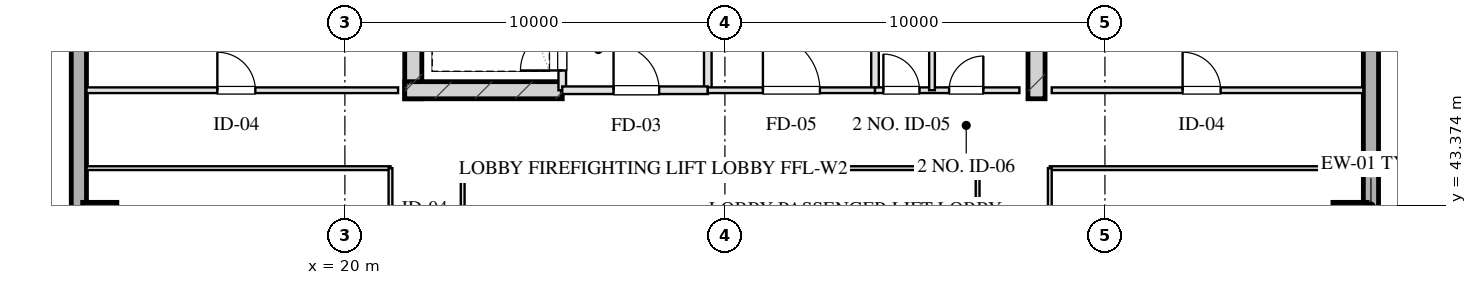
"""IFC4 building model, lengths in metres.
Left out: names, types, materials, properties, quantities, classifications, styles, units other than length and angle.
Written with IfcOpenShell. Run it as: python <this file> out.ifc"""

import sys

from ifc_helpers import new_model, si_unit, direction, frame, frame_2d, origin, origin_2d, place, context, subcontext, project, spatial, rectangle, hollow_rectangle, extrude, element, fill, save


model = new_model("IFC4")
c1 = context("Model", 3, precision=1e-05, world=origin(), true_north=direction((0.0, 1.0)))
c2 = subcontext(c1, "Body", "Model", "MODEL_VIEW")
j1 = project(units=[si_unit("LENGTHUNIT", "METRE"), si_unit("PLANEANGLEUNIT", "RADIAN")], contexts=[c1])
p1 = place(None, origin())
s1 = spatial("IfcSite", under=j1, at=p1, CompositionType="ELEMENT")
p2 = place(p1, origin())
s2 = spatial("IfcBuilding", under=s1, at=p2, CompositionType="ELEMENT")
p3 = place(p2, frame((0.0, 0.0, 209.3)))
s3 = spatial("IfcBuildingStorey", under=s2, at=p3, CompositionType="ELEMENT", Elevation=209.3)
for number, where, z_axis, x_axis in (
    (1, (21.8, 46.175, 0.0), (0.0, 0.0, 1.0), (0.0, 1.0, 0.0)),
    (2, (38.2, 46.175, 0.0), (0.0, 0.0, 1.0), (0.0, 1.0, 0.0)),
):
    element("IfcWall", number, at=place(p3, frame(where, z_axis=z_axis, x_axis=x_axis)), inside=s3, PredefinedType="SHEAR", context=c2, shape_type="SweptSolid", body=[
        extrude(rectangle(XDim=9.33, YDim=0.45, at=frame_2d((4.665, 0.0))), origin(), (0.0, 0.0, 1.0), 3.45),
    ])
p4 = place(p3, frame((21.575, 46.4, 0.0), z_axis=(0.0, 0.0, 1.0), x_axis=(1.0, 0.0, 0.0)))
e3 = element("IfcWall", 3, at=p4, inside=s3, PredefinedType="SHEAR", context=c2, shape_type="SweptSolid", body=[
    extrude(rectangle(XDim=4.145, YDim=0.45, at=frame_2d((2.073, 0.0))), origin(), (0.0, 0.0, 1.0), 3.45),
])
for number, where, z_axis, x_axis in (
    (4, (13.55, 43.0, 0.0), (0.0, 0.0, 1.0), (1.0, 0.0, 0.0)),
    (5, (46.45, 43.0, 0.0), (0.0, 0.0, 1.0), (1.0, 0.0, 0.0)),
):
    element("IfcColumn", number, at=place(p3, frame(where, z_axis=z_axis, x_axis=x_axis)), inside=s3, PredefinedType="COLUMN", context=c2, shape_type="SweptSolid", body=[
        extrude(hollow_rectangle(XDim=0.9, YDim=0.9, WallThickness=0.032, at=origin_2d()), origin(), (0.0, 0.0, 1.0), 3.451),
    ])
p5 = place(p3, frame((13.0, 10.8, 0.0), z_axis=(0.0, 0.0, 1.0), x_axis=(0.0, 1.0, 0.0)))
e6 = element("IfcWall", 6, at=p5, inside=s3, PredefinedType="SOLIDWALL", context=c2, shape_type="SweptSolid", body=[
    extrude(rectangle(XDim=46.4, YDim=0.4, at=frame_2d((23.2, 0.0))), origin(), (0.0, 0.0, 1.0), 2.61),
])
p6 = place(p5, frame((24.75, 0.0, 0.75)))
e7 = element("IfcOpeningElement", 7, at=p6, cuts=e6, PredefinedType="OPENING", context=c2, shape_type="SweptSolid", body=[
    extrude(rectangle(XDim=2.1, YDim=1.46, at=frame_2d((1.05, 0.73))), frame((0.0, 0.21, 0.0), z_axis=(0.0, -1.0, 0.0), x_axis=(1.0, 0.0, 0.0)), (0.0, 0.0, 1.0), 0.42),
])
p7 = place(p5, frame((28.55, 0.0, 0.75)))
e8 = element("IfcOpeningElement", 8, at=p7, cuts=e6, PredefinedType="OPENING", context=c2, shape_type="SweptSolid", body=[
    extrude(rectangle(XDim=2.1, YDim=1.46, at=frame_2d((1.05, 0.73))), frame((0.0, 0.21, 0.0), z_axis=(0.0, -1.0, 0.0), x_axis=(1.0, 0.0, 0.0)), (0.0, 0.0, 1.0), 0.42),
])
p8 = place(p5, frame((19.55, 0.0, 0.0)))
e9 = element("IfcOpeningElement", 9, at=p8, cuts=e6, PredefinedType="OPENING", context=c2, shape_type="SweptSolid", body=[
    extrude(rectangle(XDim=1.1, YDim=2.15, at=frame_2d((0.55, 1.075))), frame((0.0, 0.21, 0.0), z_axis=(0.0, -1.0, 0.0), x_axis=(1.0, 0.0, 0.0)), (0.0, 0.0, 1.0), 0.42),
])
p9 = place(p3, frame((47.0, 57.2, 0.0), z_axis=(0.0, 0.0, 1.0), x_axis=(0.0, -1.0, 0.0)))
e10 = element("IfcWall", 10, at=p9, inside=s3, PredefinedType="SOLIDWALL", context=c2, shape_type="SweptSolid", body=[
    extrude(rectangle(XDim=46.4, YDim=0.4, at=frame_2d((23.2, 0.0))), origin(), (0.0, 0.0, 1.0), 2.61),
])
p10 = place(p9, frame((19.55, 0.0, 0.75)))
e11 = element("IfcOpeningElement", 11, at=p10, cuts=e10, PredefinedType="OPENING", context=c2, shape_type="SweptSolid", body=[
    extrude(rectangle(XDim=2.1, YDim=1.46, at=frame_2d((1.05, 0.73))), frame((0.0, 0.21, 0.0), z_axis=(0.0, -1.0, 0.0), x_axis=(1.0, 0.0, 0.0)), (0.0, 0.0, 1.0), 0.42),
])
p11 = place(p9, frame((15.75, 0.0, 0.75)))
e12 = element("IfcOpeningElement", 12, at=p11, cuts=e10, PredefinedType="OPENING", context=c2, shape_type="SweptSolid", body=[
    extrude(rectangle(XDim=2.1, YDim=1.46, at=frame_2d((1.05, 0.73))), frame((0.0, 0.21, 0.0), z_axis=(0.0, -1.0, 0.0), x_axis=(1.0, 0.0, 0.0)), (0.0, 0.0, 1.0), 0.42),
])
p12 = place(p9, frame((28.45, 0.0, 0.0)))
e13 = element("IfcOpeningElement", 13, at=p12, cuts=e10, PredefinedType="OPENING", context=c2, shape_type="SweptSolid", body=[
    extrude(rectangle(XDim=1.1, YDim=2.15, at=frame_2d((0.55, 1.075))), frame((0.0, 0.21, 0.0), z_axis=(0.0, -1.0, 0.0), x_axis=(1.0, 0.0, 0.0)), (0.0, 0.0, 1.0), 0.42),
])
p13 = place(p3, frame((25.72, 46.4, 0.0), z_axis=(0.0, 0.0, 1.0), x_axis=(0.0, 1.0, 0.0)))
e14 = element("IfcWall", 14, at=p13, inside=s3, PredefinedType="PARTITIONING", context=c2, shape_type="SweptSolid", body=[
    extrude(rectangle(XDim=1.9, YDim=0.2, at=frame_2d((0.95, 0.0))), origin(), (0.0, 0.0, 1.0), 3.175),
])
p14 = place(p13, frame((0.52, 0.0, 0.0)))
e15 = element("IfcOpeningElement", 15, at=p14, cuts=e14, PredefinedType="OPENING", context=c2, shape_type="SweptSolid", body=[
    extrude(rectangle(XDim=1.1, YDim=2.05, at=frame_2d((0.55, 1.025))), frame((0.0, 0.11, 0.0), z_axis=(0.0, -1.0, 0.0), x_axis=(1.0, 0.0, 0.0)), (0.0, 0.0, 1.0), 0.22),
])
p15 = place(p3, frame((29.55, 46.4, 0.0), z_axis=(0.0, 0.0, 1.0), x_axis=(0.0, 1.0, 0.0)))
e16 = element("IfcWall", 16, at=p15, inside=s3, PredefinedType="PARTITIONING", context=c2, shape_type="SweptSolid", body=[
    extrude(rectangle(XDim=8.43, YDim=0.2, at=frame_2d((4.215, 0.0))), origin(), (0.0, 0.0, 1.0), 3.175),
])
p16 = place(p3, frame((25.72, 46.4, 0.0), z_axis=(0.0, 0.0, 1.0), x_axis=(1.0, 0.0, 0.0)))
e17 = element("IfcWall", 17, at=p16, inside=s3, PredefinedType="PARTITIONING", context=c2, shape_type="SweptSolid", body=[
    extrude(rectangle(XDim=3.83, YDim=0.2, at=frame_2d((1.915, 0.0))), origin(), (0.0, 0.0, 1.0), 3.175),
])
p17 = place(p16, frame((1.35, 0.0, 0.0)))
e18 = element("IfcOpeningElement", 18, at=p17, cuts=e17, PredefinedType="OPENING", context=c2, shape_type="SweptSolid", body=[
    extrude(rectangle(XDim=1.2, YDim=2.05, at=frame_2d((0.6, 1.025))), frame((0.0, 0.11, 0.0), z_axis=(0.0, -1.0, 0.0), x_axis=(1.0, 0.0, 0.0)), (0.0, 0.0, 1.0), 0.22),
])
p18 = place(p3, frame((33.95, 46.4, 0.0), z_axis=(0.0, 0.0, 1.0), x_axis=(0.0, 1.0, 0.0)))
e19 = element("IfcWall", 19, at=p18, inside=s3, PredefinedType="PARTITIONING", context=c2, shape_type="SweptSolid", body=[
    extrude(rectangle(XDim=8.43, YDim=0.2, at=frame_2d((4.215, 0.0))), origin(), (0.0, 0.0, 1.0), 3.175),
])
p19 = place(p3, frame((29.55, 46.4, 0.0), z_axis=(0.0, 0.0, 1.0), x_axis=(1.0, 0.0, 0.0)))
e20 = element("IfcWall", 20, at=p19, inside=s3, PredefinedType="PARTITIONING", context=c2, shape_type="SweptSolid", body=[
    extrude(rectangle(XDim=4.4, YDim=0.15, at=frame_2d((2.2, 0.0))), origin(), (0.0, 0.0, 1.0), 3.175),
])
p20 = place(p19, frame((1.45, 0.0, 0.0)))
e21 = element("IfcOpeningElement", 21, at=p20, cuts=e20, PredefinedType="OPENING", context=c2, shape_type="SweptSolid", body=[
    extrude(rectangle(XDim=1.5, YDim=2.05, at=frame_2d((0.75, 1.025))), frame((0.0, 0.085, 0.0), z_axis=(0.0, -1.0, 0.0), x_axis=(1.0, 0.0, 0.0)), (0.0, 0.0, 1.0), 0.17),
])
p21 = place(p3, frame((33.95, 46.4, 0.0), z_axis=(0.0, 0.0, 1.0), x_axis=(1.0, 0.0, 0.0)))
e22 = element("IfcWall", 22, at=p21, inside=s3, PredefinedType="PARTITIONING", context=c2, shape_type="SweptSolid", body=[
    extrude(rectangle(XDim=3.8, YDim=0.15, at=frame_2d((1.9, 0.0))), origin(), (0.0, 0.0, 1.0), 3.175),
])
p22 = place(p21, frame((0.22, 0.0, 0.0)))
e23 = element("IfcOpeningElement", 23, at=p22, cuts=e22, PredefinedType="OPENING", context=c2, shape_type="SweptSolid", body=[
    extrude(rectangle(XDim=0.95, YDim=2.05, at=frame_2d((0.475, 1.025))), frame((0.0, 0.085, 0.0), z_axis=(0.0, -1.0, 0.0), x_axis=(1.0, 0.0, 0.0)), (0.0, 0.0, 1.0), 0.17),
])
p23 = place(p21, frame((1.95, 0.0, 0.0)))
e24 = element("IfcOpeningElement", 24, at=p23, cuts=e22, PredefinedType="OPENING", context=c2, shape_type="SweptSolid", body=[
    extrude(rectangle(XDim=0.9, YDim=2.05, at=frame_2d((0.45, 1.025))), frame((0.0, 0.085, 0.0), z_axis=(0.0, -1.0, 0.0), x_axis=(1.0, 0.0, 0.0)), (0.0, 0.0, 1.0), 0.17),
])
p24 = place(p3, frame((35.45, 46.4, 0.0), z_axis=(0.0, 0.0, 1.0), x_axis=(0.0, 1.0, 0.0)))
e25 = element("IfcWall", 25, at=p24, inside=s3, PredefinedType="PARTITIONING", context=c2, shape_type="SweptSolid", body=[
    extrude(rectangle(XDim=8.43, YDim=0.15, at=frame_2d((4.215, 0.0))), origin(), (0.0, 0.0, 1.0), 2.765),
])
p25 = place(p24, frame((2.55, 0.0, 0.0)))
e26 = element("IfcOpeningElement", 26, at=p25, cuts=e25, PredefinedType="OPENING", context=c2, shape_type="SweptSolid", body=[
    extrude(rectangle(XDim=0.95, YDim=2.05, at=frame_2d((0.475, 1.025))), frame((0.0, 0.085, 0.0), z_axis=(0.0, -1.0, 0.0), x_axis=(1.0, 0.0, 0.0)), (0.0, 0.0, 1.0), 0.17),
])
p26 = place(p24, frame((5.6, 0.0, 0.0)))
e27 = element("IfcOpeningElement", 27, at=p26, cuts=e25, PredefinedType="OPENING", context=c2, shape_type="SweptSolid", body=[
    extrude(rectangle(XDim=0.9, YDim=2.05, at=frame_2d((0.45, 1.025))), frame((0.0, 0.085, 0.0), z_axis=(0.0, -1.0, 0.0), x_axis=(1.0, 0.0, 0.0)), (0.0, 0.0, 1.0), 0.17),
])
p27 = place(p3, frame((13.2, 46.4, 0.0), z_axis=(0.0, 0.0, 1.0), x_axis=(1.0, 0.0, 0.0)))
e28 = element("IfcWall", 28, at=p27, inside=s3, PredefinedType="PARTITIONING", context=c2, shape_type="SweptSolid", body=[
    extrude(rectangle(XDim=8.2, YDim=0.15, at=frame_2d((4.1, 0.0))), origin(), (0.0, 0.0, 1.0), 3.175),
])
p28 = place(p27, frame((3.444, 0.0, 0.0)))
e29 = element("IfcOpeningElement", 29, at=p28, cuts=e28, PredefinedType="OPENING", context=c2, shape_type="SweptSolid", body=[
    extrude(rectangle(XDim=1.0, YDim=2.05, at=frame_2d((0.5, 1.025))), frame((0.0, 0.085, 0.0), z_axis=(0.0, -1.0, 0.0), x_axis=(1.0, 0.0, 0.0)), (0.0, 0.0, 1.0), 0.17),
])
p29 = place(p3, frame((38.6, 46.4, 0.0), z_axis=(0.0, 0.0, 1.0), x_axis=(1.0, 0.0, 0.0)))
e30 = element("IfcWall", 30, at=p29, inside=s3, PredefinedType="PARTITIONING", context=c2, shape_type="SweptSolid", body=[
    extrude(rectangle(XDim=8.2, YDim=0.15, at=frame_2d((4.1, 0.0))), origin(), (0.0, 0.0, 1.0), 3.175),
])
p30 = place(p29, frame((3.444, 0.0, 0.0)))
e31 = element("IfcOpeningElement", 31, at=p30, cuts=e30, PredefinedType="OPENING", context=c2, shape_type="SweptSolid", body=[
    extrude(rectangle(XDim=1.0, YDim=2.05, at=frame_2d((0.5, 1.025))), frame((0.0, 0.085, 0.0), z_axis=(0.0, -1.0, 0.0), x_axis=(1.0, 0.0, 0.0)), (0.0, 0.0, 1.0), 0.17),
])
p31 = place(p3, frame((13.2, 44.35, 0.0), z_axis=(0.0, 0.0, 1.0), x_axis=(1.0, 0.0, 0.0)))
e32 = element("IfcWall", 32, at=p31, inside=s3, PredefinedType="MOVABLE", context=c2, shape_type="SweptSolid", body=[
    extrude(rectangle(XDim=8.0, YDim=0.1, at=frame_2d((4.0, 0.0))), origin(), (0.0, 0.0, 1.0), 3.175),
])
p32 = place(p3, frame((23.1, 44.35, 0.0), z_axis=(0.0, 0.0, 1.0), x_axis=(1.0, 0.0, 0.0)))
e33 = element("IfcWall", 33, at=p32, inside=s3, PredefinedType="MOVABLE", context=c2, shape_type="SweptSolid", body=[
    extrude(rectangle(XDim=13.55, YDim=0.1, at=frame_2d((6.775, 0.0))), origin(), (0.0, 0.0, 1.0), 3.175),
])
p33 = place(p3, frame((38.55, 44.35, 0.0), z_axis=(0.0, 0.0, 1.0), x_axis=(1.0, 0.0, 0.0)))
e34 = element("IfcWall", 34, at=p33, inside=s3, PredefinedType="MOVABLE", context=c2, shape_type="SweptSolid", body=[
    extrude(rectangle(XDim=8.25, YDim=0.1, at=frame_2d((4.125, 0.0))), origin(), (0.0, 0.0, 1.0), 3.175),
])
p34 = place(p3, frame((21.2, 23.65, 0.0), z_axis=(0.0, 0.0, 1.0), x_axis=(0.0, 1.0, 0.0)))
e35 = element("IfcWall", 35, at=p34, inside=s3, PredefinedType="MOVABLE", context=c2, shape_type="SweptSolid", body=[
    extrude(rectangle(XDim=20.7, YDim=0.1, at=frame_2d((10.35, 0.0))), origin(), (0.0, 0.0, 1.0), 3.175),
])
p35 = place(p34, frame((2.175, 0.0, 0.0)))
e36 = element("IfcOpeningElement", 36, at=p35, cuts=e35, PredefinedType="OPENING", context=c2, shape_type="SweptSolid", body=[
    extrude(rectangle(XDim=1.05, YDim=2.05, at=frame_2d((0.525, 1.025))), frame((0.0, 0.06, 0.0), z_axis=(0.0, -1.0, 0.0), x_axis=(1.0, 0.0, 0.0)), (0.0, 0.0, 1.0), 0.12),
])
p36 = place(p34, frame((6.75, 0.0, 0.0)))
e37 = element("IfcOpeningElement", 37, at=p36, cuts=e35, PredefinedType="OPENING", context=c2, shape_type="SweptSolid", body=[
    extrude(rectangle(XDim=1.0, YDim=2.05, at=frame_2d((0.5, 1.025))), frame((0.0, 0.06, 0.0), z_axis=(0.0, -1.0, 0.0), x_axis=(1.0, 0.0, 0.0)), (0.0, 0.0, 1.0), 0.12),
])
p37 = place(p34, frame((9.85, 0.0, 0.0)))
e38 = element("IfcOpeningElement", 38, at=p37, cuts=e35, PredefinedType="OPENING", context=c2, shape_type="SweptSolid", body=[
    extrude(rectangle(XDim=1.0, YDim=2.05, at=frame_2d((0.5, 1.025))), frame((0.0, 0.06, 0.0), z_axis=(0.0, -1.0, 0.0), x_axis=(1.0, 0.0, 0.0)), (0.0, 0.0, 1.0), 0.12),
])
p38 = place(p34, frame((12.95, 0.0, 0.0)))
e39 = element("IfcOpeningElement", 39, at=p38, cuts=e35, PredefinedType="OPENING", context=c2, shape_type="SweptSolid", body=[
    extrude(rectangle(XDim=1.0, YDim=2.05, at=frame_2d((0.5, 1.025))), frame((0.0, 0.06, 0.0), z_axis=(0.0, -1.0, 0.0), x_axis=(1.0, 0.0, 0.0)), (0.0, 0.0, 1.0), 0.12),
])
p39 = place(p34, frame((17.525, 0.0, 0.0)))
e40 = element("IfcOpeningElement", 40, at=p39, cuts=e35, PredefinedType="OPENING", context=c2, shape_type="SweptSolid", body=[
    extrude(rectangle(XDim=1.0, YDim=2.05, at=frame_2d((0.5, 1.025))), frame((0.0, 0.06, 0.0), z_axis=(0.0, -1.0, 0.0), x_axis=(1.0, 0.0, 0.0)), (0.0, 0.0, 1.0), 0.12),
])
p40 = place(p3, frame((23.1, 23.65, 0.0), z_axis=(0.0, 0.0, 1.0), x_axis=(0.0, 1.0, 0.0)))
e41 = element("IfcWall", 41, at=p40, inside=s3, PredefinedType="MOVABLE", context=c2, shape_type="SweptSolid", body=[
    extrude(rectangle(XDim=20.7, YDim=0.1, at=frame_2d((10.35, 0.0))), origin(), (0.0, 0.0, 1.0), 3.175),
])
p41 = place(p40, frame((2.857, 0.0, 0.0)))
e42 = element("IfcOpeningElement", 42, at=p41, cuts=e41, PredefinedType="OPENING", context=c2, shape_type="SweptSolid", body=[
    extrude(rectangle(XDim=1.1, YDim=2.05, at=frame_2d((0.55, 1.025))), frame((0.0, 0.06, 0.0), z_axis=(0.0, -1.0, 0.0), x_axis=(1.0, 0.0, 0.0)), (0.0, 0.0, 1.0), 0.12),
])
p42 = place(p40, frame((17.208, 0.0, 0.0)))
e43 = element("IfcOpeningElement", 43, at=p42, cuts=e41, PredefinedType="OPENING", context=c2, shape_type="SweptSolid", body=[
    extrude(rectangle(XDim=1.1, YDim=2.05, at=frame_2d((0.55, 1.025))), frame((0.0, 0.06, 0.0), z_axis=(0.0, -1.0, 0.0), x_axis=(1.0, 0.0, 0.0)), (0.0, 0.0, 1.0), 0.12),
])
p43 = place(p3, frame((36.65, 23.65, 0.0), z_axis=(0.0, 0.0, 1.0), x_axis=(0.0, 1.0, 0.0)))
e44 = element("IfcWall", 44, at=p43, inside=s3, PredefinedType="MOVABLE", context=c2, shape_type="SweptSolid", body=[
    extrude(rectangle(XDim=20.7, YDim=0.1, at=frame_2d((10.35, 0.0))), origin(), (0.0, 0.0, 1.0), 3.175),
])
p44 = place(p43, frame((9.71, 0.0, 0.0)))
e45 = element("IfcOpeningElement", 45, at=p44, cuts=e44, PredefinedType="OPENING", context=c2, shape_type="SweptSolid", body=[
    extrude(rectangle(XDim=1.1, YDim=2.05, at=frame_2d((0.55, 1.025))), frame((0.0, 0.06, 0.0), z_axis=(0.0, -1.0, 0.0), x_axis=(1.0, 0.0, 0.0)), (0.0, 0.0, 1.0), 0.12),
])
p45 = place(p3, frame((38.55, 23.65, 0.0), z_axis=(0.0, 0.0, 1.0), x_axis=(0.0, 1.0, 0.0)))
e46 = element("IfcWall", 46, at=p45, inside=s3, PredefinedType="MOVABLE", context=c2, shape_type="SweptSolid", body=[
    extrude(rectangle(XDim=20.7, YDim=0.1, at=frame_2d((10.35, 0.0))), origin(), (0.0, 0.0, 1.0), 3.175),
])
p46 = place(p45, frame((2.675, 0.0, 0.0)))
e47 = element("IfcOpeningElement", 47, at=p46, cuts=e46, PredefinedType="OPENING", context=c2, shape_type="SweptSolid", body=[
    extrude(rectangle(XDim=1.0, YDim=2.05, at=frame_2d((0.5, 1.025))), frame((0.0, 0.06, 0.0), z_axis=(0.0, -1.0, 0.0), x_axis=(1.0, 0.0, 0.0)), (0.0, 0.0, 1.0), 0.12),
])
p47 = place(p45, frame((9.85, 0.0, 0.0)))
e48 = element("IfcOpeningElement", 48, at=p47, cuts=e46, PredefinedType="OPENING", context=c2, shape_type="SweptSolid", body=[
    extrude(rectangle(XDim=1.0, YDim=2.05, at=frame_2d((0.5, 1.025))), frame((0.0, 0.06, 0.0), z_axis=(0.0, -1.0, 0.0), x_axis=(1.0, 0.0, 0.0)), (0.0, 0.0, 1.0), 0.12),
])
p48 = place(p45, frame((17.025, 0.0, 0.0)))
e49 = element("IfcOpeningElement", 49, at=p48, cuts=e46, PredefinedType="OPENING", context=c2, shape_type="SweptSolid", body=[
    extrude(rectangle(XDim=1.0, YDim=2.05, at=frame_2d((0.5, 1.025))), frame((0.0, 0.06, 0.0), z_axis=(0.0, -1.0, 0.0), x_axis=(1.0, 0.0, 0.0)), (0.0, 0.0, 1.0), 0.12),
])
p49 = place(p14, origin())
e50 = element("IfcDoor", 50, at=p49, inside=s3, OperationType="SINGLE_SWING_LEFT", PredefinedType="DOOR", context=c2, shape_type="SweptSolid", body=[
    extrude(rectangle(XDim=1.1, YDim=2.05, at=frame_2d((0.55, 1.025))), frame((0.0, 0.025, 0.0), z_axis=(0.0, -1.0, 0.0), x_axis=(1.0, 0.0, 0.0)), (0.0, 0.0, 1.0), 0.05),
])
fill(e15, e50)
p50 = place(p17, origin())
e51 = element("IfcDoor", 51, at=p50, inside=s3, OperationType="SINGLE_SWING_LEFT", PredefinedType="DOOR", context=c2, shape_type="SweptSolid", body=[
    extrude(rectangle(XDim=1.2, YDim=2.05, at=frame_2d((0.6, 1.025))), frame((0.0, 0.025, 0.0), z_axis=(0.0, -1.0, 0.0), x_axis=(1.0, 0.0, 0.0)), (0.0, 0.0, 1.0), 0.05),
])
fill(e18, e51)
p51 = place(p20, origin())
e52 = element("IfcDoor", 52, at=p51, inside=s3, OperationType="SINGLE_SWING_LEFT", PredefinedType="DOOR", context=c2, shape_type="SweptSolid", body=[
    extrude(rectangle(XDim=1.5, YDim=2.05, at=frame_2d((0.75, 1.025))), frame((0.0, 0.025, 0.0), z_axis=(0.0, -1.0, 0.0), x_axis=(1.0, 0.0, 0.0)), (0.0, 0.0, 1.0), 0.05),
])
fill(e21, e52)
p52 = place(p22, origin())
e53 = element("IfcDoor", 53, at=p52, inside=s3, OperationType="SINGLE_SWING_LEFT", PredefinedType="DOOR", context=c2, shape_type="SweptSolid", body=[
    extrude(rectangle(XDim=0.95, YDim=2.05, at=frame_2d((0.475, 1.025))), frame((0.0, 0.025, 0.0), z_axis=(0.0, -1.0, 0.0), x_axis=(1.0, 0.0, 0.0)), (0.0, 0.0, 1.0), 0.05),
])
fill(e23, e53)
p53 = place(p23, origin())
e54 = element("IfcDoor", 54, at=p53, inside=s3, OperationType="SINGLE_SWING_RIGHT", PredefinedType="DOOR", context=c2, shape_type="SweptSolid", body=[
    extrude(rectangle(XDim=0.9, YDim=2.05, at=frame_2d((0.45, 1.025))), frame((0.0, 0.025, 0.0), z_axis=(0.0, -1.0, 0.0), x_axis=(1.0, 0.0, 0.0)), (0.0, 0.0, 1.0), 0.05),
])
fill(e24, e54)
p54 = place(p28, origin())
e55 = element("IfcDoor", 55, at=p54, inside=s3, OperationType="SINGLE_SWING_LEFT", PredefinedType="DOOR", context=c2, shape_type="SweptSolid", body=[
    extrude(rectangle(XDim=1.0, YDim=2.05, at=frame_2d((0.5, 1.025))), frame((0.0, 0.025, 0.0), z_axis=(0.0, -1.0, 0.0), x_axis=(1.0, 0.0, 0.0)), (0.0, 0.0, 1.0), 0.05),
])
fill(e29, e55)
p55 = place(p30, origin())
e56 = element("IfcDoor", 56, at=p55, inside=s3, OperationType="SINGLE_SWING_LEFT", PredefinedType="DOOR", context=c2, shape_type="SweptSolid", body=[
    extrude(rectangle(XDim=1.0, YDim=2.05, at=frame_2d((0.5, 1.025))), frame((0.0, 0.025, 0.0), z_axis=(0.0, -1.0, 0.0), x_axis=(1.0, 0.0, 0.0)), (0.0, 0.0, 1.0), 0.05),
])
fill(e31, e56)
save(model, sys.argv[1])
